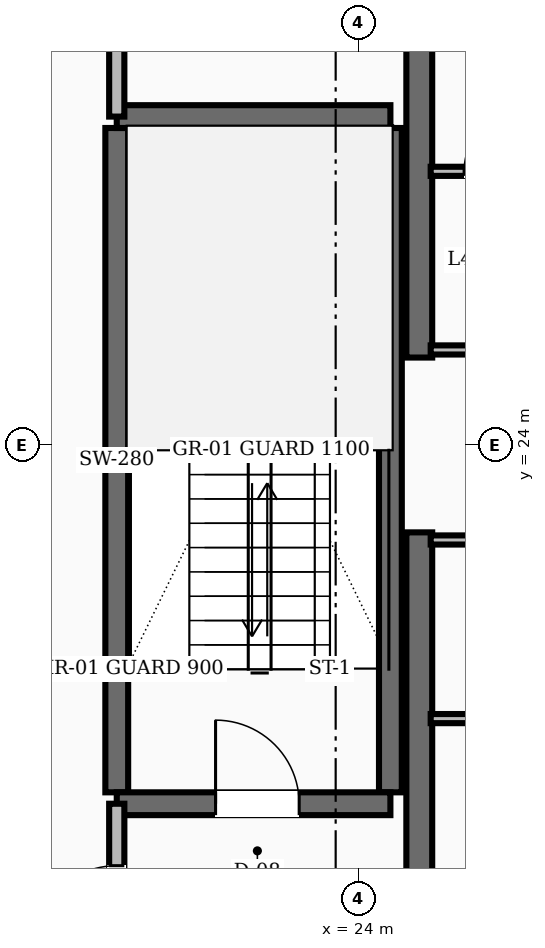
"""IFC4 building model, lengths in metres.
Left out: names, types, materials, properties, quantities, classifications, styles, units other than length and angle.
Written with IfcOpenShell. Run it as: python <this file> out.ifc"""

import sys

from ifc_helpers import new_model, si_unit, direction, frame, frame_2d, origin, place, context, subcontext, project, spatial, rectangle, extrude, element, fill, save


model = new_model("IFC4")
c1 = context("Model", 3, precision=1e-05, world=origin(), true_north=direction((0.0, 1.0)))
c2 = subcontext(c1, "Body", "Model", "MODEL_VIEW")
j1 = project(units=[si_unit("LENGTHUNIT", "METRE"), si_unit("PLANEANGLEUNIT", "RADIAN")], contexts=[c1])
p1 = place(None, origin())
s1 = spatial("IfcSite", under=j1, at=p1, CompositionType="ELEMENT")
p2 = place(p1, origin())
s2 = spatial("IfcBuilding", under=s1, at=p2, CompositionType="ELEMENT")
p3 = place(p2, frame((0.0, 0.0, 160.4)))
s3 = spatial("IfcBuildingStorey", under=s2, at=p3, CompositionType="ELEMENT", Elevation=160.4)
for number, where, z_axis, x_axis in (
    (1, (24.8, 16.55, 0.0), (0.0, 0.0, 1.0), (0.0, 1.0, 0.0)),
    (2, (24.8, 25.15, 0.0), (0.0, 0.0, 1.0), (0.0, 1.0, 0.0)),
):
    element("IfcWall", number, at=place(p3, frame(where, z_axis=z_axis, x_axis=x_axis)), inside=s3, PredefinedType="SHEAR", context=c2, shape_type="SweptSolid", body=[
        extrude(rectangle(XDim=6.3, YDim=0.34, at=frame_2d((3.15, 0.0))), origin(), (0.0, 0.0, 1.0), 3.6),
    ])
for number, where, z_axis, x_axis in (
    (3, (20.82, 19.43, 0.0), (0.0, 0.0, 1.0), (0.0, 1.0, 0.0)),
    (4, (24.42, 19.43, 0.0), (0.0, 0.0, 1.0), (0.0, 1.0, 0.0)),
):
    element("IfcWall", number, at=place(p3, frame(where, z_axis=z_axis, x_axis=x_axis)), inside=s3, PredefinedType="SHEAR", context=c2, shape_type="SweptSolid", body=[
        extrude(rectangle(XDim=8.74, YDim=0.3, at=frame_2d((4.37, 0.0))), origin(), (0.0, 0.0, 1.0), 3.6),
    ])
p4 = place(p3, frame((20.82, 19.28, 0.0), z_axis=(0.0, 0.0, 1.0), x_axis=(1.0, 0.0, 0.0)))
e5 = element("IfcWall", 5, at=p4, inside=s3, PredefinedType="SHEAR", context=c2, shape_type="SweptSolid", body=[
    extrude(rectangle(XDim=3.6, YDim=0.3, at=frame_2d((1.8, 0.0))), origin(), (0.0, 0.0, 1.0), 3.6),
])
p5 = place(p4, frame((1.3, 0.0, 0.0)))
e6 = element("IfcOpeningElement", 6, at=p5, cuts=e5, PredefinedType="OPENING", context=c2, shape_type="SweptSolid", body=[
    extrude(rectangle(XDim=1.1, YDim=2.1, at=frame_2d((0.55, 1.05))), frame((0.0, 0.16, 0.0), z_axis=(0.0, -1.0, 0.0), x_axis=(1.0, 0.0, 0.0)), (0.0, 0.0, 1.0), 0.32),
])
p6 = place(p3, frame((20.82, 28.32, 0.0), z_axis=(0.0, 0.0, 1.0), x_axis=(1.0, 0.0, 0.0)))
e7 = element("IfcWall", 7, at=p6, inside=s3, PredefinedType="SHEAR", context=c2, shape_type="SweptSolid", body=[
    extrude(rectangle(XDim=3.6, YDim=0.3, at=frame_2d((1.8, 0.0))), origin(), (0.0, 0.0, 1.0), 3.6),
])
p7 = place(p3, frame((20.82, 16.55, 0.0), z_axis=(0.0, 0.0, 1.0), x_axis=(0.0, 1.0, 0.0)))
e8 = element("IfcWall", 8, at=p7, inside=s3, PredefinedType="SOLIDWALL", context=c2, shape_type="SweptSolid", body=[
    extrude(rectangle(XDim=2.73, YDim=0.2, at=frame_2d((1.365, 0.0))), origin(), (0.0, 0.0, 1.0), 2.8),
])
p8 = place(p7, frame((0.815, 0.0, 0.0)))
e9 = element("IfcOpeningElement", 9, at=p8, cuts=e8, PredefinedType="OPENING", context=c2, shape_type="SweptSolid", body=[
    extrude(rectangle(XDim=1.1, YDim=2.1, at=frame_2d((0.55, 1.05))), frame((0.0, 0.11, 0.0), z_axis=(0.0, -1.0, 0.0), x_axis=(1.0, 0.0, 0.0)), (0.0, 0.0, 1.0), 0.22),
])
p9 = place(p3, frame((20.82, 28.32, 0.0), z_axis=(0.0, 0.0, 1.0), x_axis=(0.0, 1.0, 0.0)))
e10 = element("IfcWall", 10, at=p9, inside=s3, PredefinedType="SOLIDWALL", context=c2, shape_type="SweptSolid", body=[
    extrude(rectangle(XDim=3.13, YDim=0.2, at=frame_2d((1.565, 0.0))), origin(), (0.0, 0.0, 1.0), 2.8),
])
p10 = place(p9, frame((1.09, 0.0, 0.0)))
e11 = element("IfcOpeningElement", 11, at=p10, cuts=e10, PredefinedType="OPENING", context=c2, shape_type="SweptSolid", body=[
    extrude(rectangle(XDim=0.95, YDim=2.1, at=frame_2d((0.475, 1.05))), frame((0.0, 0.11, 0.0), z_axis=(0.0, -1.0, 0.0), x_axis=(1.0, 0.0, 0.0)), (0.0, 0.0, 1.0), 0.22),
])
p11 = place(p3, frame((24.95, 25.25, 0.0), z_axis=(0.0, 0.0, 1.0), x_axis=(1.0, 0.0, 0.0)))
e12 = element("IfcWall", 12, at=p11, inside=s3, PredefinedType="PARTITIONING", context=c2, shape_type="SweptSolid", body=[
    extrude(rectangle(XDim=3.2, YDim=0.12, at=frame_2d((1.6, 0.0))), origin(), (0.0, 0.0, 1.0), 2.8),
])
p12 = place(p11, frame((1.125, 0.0, 0.0)))
e13 = element("IfcOpeningElement", 13, at=p12, cuts=e12, PredefinedType="OPENING", context=c2, shape_type="SweptSolid", body=[
    extrude(rectangle(XDim=0.95, YDim=2.1, at=frame_2d((0.475, 1.05))), frame((0.0, 0.07, 0.0), z_axis=(0.0, -1.0, 0.0), x_axis=(1.0, 0.0, 0.0)), (0.0, 0.0, 1.0), 0.14),
])
p13 = place(p3, frame((24.95, 22.75, 0.0), z_axis=(0.0, 0.0, 1.0), x_axis=(1.0, 0.0, 0.0)))
e14 = element("IfcWall", 14, at=p13, inside=s3, PredefinedType="PARTITIONING", context=c2, shape_type="SweptSolid", body=[
    extrude(rectangle(XDim=3.2, YDim=0.12, at=frame_2d((1.6, 0.0))), origin(), (0.0, 0.0, 1.0), 2.8),
])
p14 = place(p13, frame((1.125, 0.0, 0.0)))
e15 = element("IfcOpeningElement", 15, at=p14, cuts=e14, PredefinedType="OPENING", context=c2, shape_type="SweptSolid", body=[
    extrude(rectangle(XDim=0.95, YDim=2.1, at=frame_2d((0.475, 1.05))), frame((0.0, 0.07, 0.0), z_axis=(0.0, -1.0, 0.0), x_axis=(1.0, 0.0, 0.0)), (0.0, 0.0, 1.0), 0.14),
])
p15 = place(p3, frame((24.95, 27.6, 0.0), z_axis=(0.0, 0.0, 1.0), x_axis=(1.0, 0.0, 0.0)))
e16 = element("IfcWall", 16, at=p15, inside=s3, PredefinedType="PARTITIONING", context=c2, shape_type="SweptSolid", body=[
    extrude(rectangle(XDim=3.2, YDim=0.12, at=frame_2d((1.6, 0.0))), origin(), (0.0, 0.0, 1.0), 2.8),
])
p16 = place(p15, frame((0.44, 0.0, 0.0)))
e17 = element("IfcOpeningElement", 17, at=p16, cuts=e16, PredefinedType="OPENING", context=c2, shape_type="SweptSolid", body=[
    extrude(rectangle(XDim=0.86, YDim=2.1, at=frame_2d((0.43, 1.05))), frame((0.0, 0.07, 0.0), z_axis=(0.0, -1.0, 0.0), x_axis=(1.0, 0.0, 0.0)), (0.0, 0.0, 1.0), 0.14),
])
p17 = place(p15, frame((1.9, 0.0, 0.0)))
e18 = element("IfcOpeningElement", 18, at=p17, cuts=e16, PredefinedType="OPENING", context=c2, shape_type="SweptSolid", body=[
    extrude(rectangle(XDim=0.86, YDim=2.1, at=frame_2d((0.43, 1.05))), frame((0.0, 0.07, 0.0), z_axis=(0.0, -1.0, 0.0), x_axis=(1.0, 0.0, 0.0)), (0.0, 0.0, 1.0), 0.14),
])
p18 = place(p3, frame((24.95, 20.4, 0.0), z_axis=(0.0, 0.0, 1.0), x_axis=(1.0, 0.0, 0.0)))
e19 = element("IfcWall", 19, at=p18, inside=s3, PredefinedType="PARTITIONING", context=c2, shape_type="SweptSolid", body=[
    extrude(rectangle(XDim=3.2, YDim=0.12, at=frame_2d((1.6, 0.0))), origin(), (0.0, 0.0, 1.0), 2.8),
])
p19 = place(p18, frame((1.125, 0.0, 0.0)))
e20 = element("IfcOpeningElement", 20, at=p19, cuts=e19, PredefinedType="OPENING", context=c2, shape_type="SweptSolid", body=[
    extrude(rectangle(XDim=0.95, YDim=2.1, at=frame_2d((0.475, 1.05))), frame((0.0, 0.07, 0.0), z_axis=(0.0, -1.0, 0.0), x_axis=(1.0, 0.0, 0.0)), (0.0, 0.0, 1.0), 0.14),
])
p20 = place(p5, origin())
e21 = element("IfcDoor", 21, at=p20, inside=s3, OperationType="SINGLE_SWING_LEFT", PredefinedType="DOOR", context=c2, shape_type="SweptSolid", body=[
    extrude(rectangle(XDim=1.1, YDim=2.1, at=frame_2d((0.55, 1.05))), frame((0.0, 0.025, 0.0), z_axis=(0.0, -1.0, 0.0), x_axis=(1.0, 0.0, 0.0)), (0.0, 0.0, 1.0), 0.05),
])
fill(e6, e21)
p21 = place(p8, origin())
e22 = element("IfcDoor", 22, at=p21, inside=s3, OperationType="SINGLE_SWING_LEFT", PredefinedType="DOOR", context=c2, shape_type="SweptSolid", body=[
    extrude(rectangle(XDim=1.1, YDim=2.1, at=frame_2d((0.55, 1.05))), frame((0.0, 0.025, 0.0), z_axis=(0.0, -1.0, 0.0), x_axis=(1.0, 0.0, 0.0)), (0.0, 0.0, 1.0), 0.05),
])
fill(e9, e22)
p22 = place(p16, origin())
e23 = element("IfcDoor", 23, at=p22, inside=s3, OperationType="SINGLE_SWING_RIGHT", PredefinedType="DOOR", context=c2, shape_type="SweptSolid", body=[
    extrude(rectangle(XDim=0.86, YDim=2.1, at=frame_2d((0.43, 1.05))), frame((0.0, 0.025, 0.0), z_axis=(0.0, -1.0, 0.0), x_axis=(1.0, 0.0, 0.0)), (0.0, 0.0, 1.0), 0.05),
])
fill(e17, e23)
save(model, sys.argv[1])
